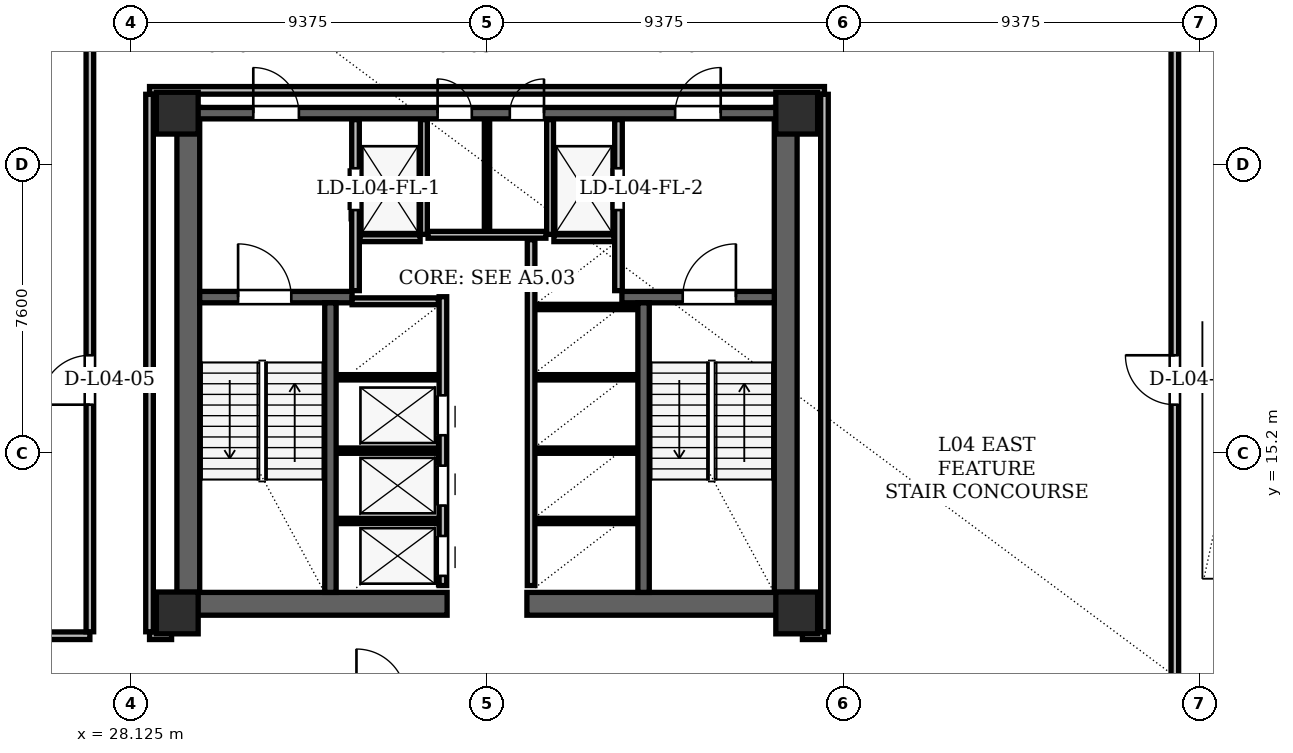
"""IFC4 building model, lengths in metres.
Left out: names, types, materials, properties, quantities, classifications, styles, units other than length and angle.
Written with IfcOpenShell. Run it as: python <this file> out.ifc"""

import sys

from ifc_helpers import new_model, si_unit, direction, frame, frame_2d, origin, origin_2d, place, context, subcontext, project, spatial, rectangle, hollow_rectangle, extrude, element, fill, save


model = new_model("IFC4")
c1 = context("Model", 3, precision=1e-05, world=origin(), true_north=direction((0.0, 1.0)))
c2 = subcontext(c1, "Body", "Model", "MODEL_VIEW")
j1 = project(units=[si_unit("LENGTHUNIT", "METRE"), si_unit("PLANEANGLEUNIT", "RADIAN")], contexts=[c1])
p1 = place(None, origin())
s1 = spatial("IfcSite", under=j1, at=p1, CompositionType="ELEMENT")
p2 = place(p1, origin())
s2 = spatial("IfcBuilding", under=s1, at=p2, CompositionType="ELEMENT")
p3 = place(p2, frame((0.0, 0.0, 18.3)))
s3 = spatial("IfcBuildingStorey", under=s2, at=p3, CompositionType="ELEMENT", Elevation=18.3)
for number, where, z_axis, x_axis in (
    (1, (29.35, 11.0, 0.0), (0.0, 0.0, 1.0), (1.0, 0.0, 0.0)),
    (2, (45.65, 11.0, 0.0), (0.0, 0.0, 1.0), (1.0, 0.0, 0.0)),
    (3, (45.65, 24.15, 0.0), (0.0, 0.0, 1.0), (1.0, 0.0, 0.0)),
    (4, (29.35, 24.15, 0.0), (0.0, 0.0, 1.0), (1.0, 0.0, 0.0)),
):
    element("IfcColumn", number, at=place(p3, frame(where, z_axis=z_axis, x_axis=x_axis)), inside=s3, PredefinedType="COLUMN", context=c2, shape_type="SweptSolid", body=[
        extrude(hollow_rectangle(XDim=1.1, YDim=1.1, WallThickness=0.09, at=origin_2d()), origin(), (0.0, 0.0, 1.0), 4.2),
    ])
for number, where, z_axis, x_axis in (
    (5, (29.64, 11.0, 0.0), (0.0, 0.0, 1.0), (0.0, 1.0, 0.0)),
    (6, (45.36, 11.0, 0.0), (0.0, 0.0, 1.0), (0.0, 1.0, 0.0)),
):
    element("IfcWall", number, at=place(p3, frame(where, z_axis=z_axis, x_axis=x_axis)), inside=s3, PredefinedType="SHEAR", context=c2, shape_type="SweptSolid", body=[
        extrude(rectangle(XDim=13.3, YDim=0.6, at=frame_2d((6.65, 0.0))), origin(), (0.0, 0.0, 1.0), 3.88),
    ])
for number, where, z_axis, x_axis in (
    (7, (29.35, 11.24, 0.0), (0.0, 0.0, 1.0), (1.0, 0.0, 0.0)),
    (8, (38.55, 11.24, 0.0), (0.0, 0.0, 1.0), (1.0, 0.0, 0.0)),
):
    element("IfcWall", number, at=place(p3, frame(where, z_axis=z_axis, x_axis=x_axis)), inside=s3, PredefinedType="SHEAR", context=c2, shape_type="SweptSolid", body=[
        extrude(rectangle(XDim=7.1, YDim=0.6, at=frame_2d((3.55, 0.0))), origin(), (0.0, 0.0, 1.0), 3.88),
    ])
p4 = place(p3, frame((29.65, 24.15, 0.0), z_axis=(0.0, 0.0, 1.0), x_axis=(1.0, 0.0, 0.0)))
e9 = element("IfcWall", 9, at=p4, inside=s3, PredefinedType="SHEAR", context=c2, shape_type="SweptSolid", body=[
    extrude(rectangle(XDim=15.7, YDim=0.3, at=frame_2d((7.85, 0.0))), origin(), (0.0, 0.0, 1.0), 3.88),
])
p5 = place(p4, frame((1.7, 0.0, 0.0)))
e10 = element("IfcOpeningElement", 10, at=p5, cuts=e9, PredefinedType="OPENING", context=c2, shape_type="SweptSolid", body=[
    extrude(rectangle(XDim=1.2, YDim=2.2, at=frame_2d((0.6, 1.1))), frame((0.0, 0.15, 0.0), z_axis=(0.0, -1.0, 0.0), x_axis=(1.0, 0.0, 0.0)), (0.0, 0.0, 1.0), 0.3),
])
p6 = place(p4, frame((12.8, 0.0, 0.0)))
e11 = element("IfcOpeningElement", 11, at=p6, cuts=e9, PredefinedType="OPENING", context=c2, shape_type="SweptSolid", body=[
    extrude(rectangle(XDim=1.2, YDim=2.2, at=frame_2d((0.6, 1.1))), frame((0.0, 0.15, 0.0), z_axis=(0.0, -1.0, 0.0), x_axis=(1.0, 0.0, 0.0)), (0.0, 0.0, 1.0), 0.3),
])
p7 = place(p4, frame((6.55, 0.0, 0.0)))
e12 = element("IfcOpeningElement", 12, at=p7, cuts=e9, PredefinedType="OPENING", context=c2, shape_type="SweptSolid", body=[
    extrude(rectangle(XDim=0.9, YDim=2.05, at=frame_2d((0.45, 1.025))), frame((0.0, 0.15, 0.0), z_axis=(0.0, -1.0, 0.0), x_axis=(1.0, 0.0, 0.0)), (0.0, 0.0, 1.0), 0.3),
])
p8 = place(p4, frame((8.45, 0.0, 0.0)))
e13 = element("IfcOpeningElement", 13, at=p8, cuts=e9, PredefinedType="OPENING", context=c2, shape_type="SweptSolid", body=[
    extrude(rectangle(XDim=0.9, YDim=2.05, at=frame_2d((0.45, 1.025))), frame((0.0, 0.15, 0.0), z_axis=(0.0, -1.0, 0.0), x_axis=(1.0, 0.0, 0.0)), (0.0, 0.0, 1.0), 0.3),
])
p9 = place(p3, frame((29.94, 19.31, 0.0), z_axis=(0.0, 0.0, 1.0), x_axis=(1.0, 0.0, 0.0)))
e14 = element("IfcWall", 14, at=p9, inside=s3, PredefinedType="SHEAR", context=c2, shape_type="SweptSolid", body=[
    extrude(rectangle(XDim=4.01, YDim=0.3, at=frame_2d((2.005, 0.0))), origin(), (0.0, 0.0, 1.0), 3.88),
])
p10 = place(p9, frame((1.01, 0.0, 0.0)))
e15 = element("IfcOpeningElement", 15, at=p10, cuts=e14, PredefinedType="OPENING", context=c2, shape_type="SweptSolid", body=[
    extrude(rectangle(XDim=1.4, YDim=2.2, at=frame_2d((0.7, 1.1))), frame((0.0, 0.15, 0.0), z_axis=(0.0, -1.0, 0.0), x_axis=(1.0, 0.0, 0.0)), (0.0, 0.0, 1.0), 0.3),
])
p11 = place(p3, frame((41.05, 19.31, 0.0), z_axis=(0.0, 0.0, 1.0), x_axis=(1.0, 0.0, 0.0)))
e16 = element("IfcWall", 16, at=p11, inside=s3, PredefinedType="SHEAR", context=c2, shape_type="SweptSolid", body=[
    extrude(rectangle(XDim=4.01, YDim=0.3, at=frame_2d((2.005, 0.0))), origin(), (0.0, 0.0, 1.0), 3.88),
])
p12 = place(p11, frame((1.6, 0.0, 0.0)))
e17 = element("IfcOpeningElement", 17, at=p12, cuts=e16, PredefinedType="OPENING", context=c2, shape_type="SweptSolid", body=[
    extrude(rectangle(XDim=1.4, YDim=2.2, at=frame_2d((0.7, 1.1))), frame((0.0, 0.15, 0.0), z_axis=(0.0, -1.0, 0.0), x_axis=(1.0, 0.0, 0.0)), (0.0, 0.0, 1.0), 0.3),
])
for number, where, z_axis, x_axis in (
    (18, (33.38, 11.54, 0.0), (0.0, 0.0, 1.0), (0.0, 1.0, 0.0)),
    (19, (41.62, 11.54, 0.0), (0.0, 0.0, 1.0), (0.0, 1.0, 0.0)),
):
    element("IfcWall", number, at=place(p3, frame(where, z_axis=z_axis, x_axis=x_axis)), inside=s3, PredefinedType="SHEAR", context=c2, shape_type="SweptSolid", body=[
        extrude(rectangle(XDim=7.62, YDim=0.3, at=frame_2d((3.81, 0.0))), origin(), (0.0, 0.0, 1.0), 3.88),
    ])
p13 = place(p3, frame((34.04, 19.48, 0.0), z_axis=(0.0, 0.0, 1.0), x_axis=(0.0, 1.0, 0.0)))
e20 = element("IfcWall", 20, at=p13, inside=s3, PredefinedType="PARTITIONING", context=c2, shape_type="SweptSolid", body=[
    extrude(rectangle(XDim=4.5, YDim=0.2, at=frame_2d((2.25, 0.0))), origin(), (0.0, 0.0, 1.0), 2.92),
])
p14 = place(p13, frame((2.12, 0.0, 0.0)))
e21 = element("IfcOpeningElement", 21, at=p14, cuts=e20, PredefinedType="OPENING", context=c2, shape_type="SweptSolid", body=[
    extrude(rectangle(XDim=1.1, YDim=2.2, at=frame_2d((0.55, 1.1))), frame((0.0, 0.1, 0.0), z_axis=(0.0, -1.0, 0.0), x_axis=(1.0, 0.0, 0.0)), (0.0, 0.0, 1.0), 0.2),
])
p15 = place(p3, frame((35.84, 20.96, 0.0), z_axis=(0.0, 0.0, 1.0), x_axis=(0.0, 1.0, 0.0)))
e22 = element("IfcWall", 22, at=p15, inside=s3, PredefinedType="PARTITIONING", context=c2, shape_type="SweptSolid", body=[
    extrude(rectangle(XDim=3.02, YDim=0.18, at=frame_2d((1.51, 0.0))), origin(), (0.0, 0.0, 1.0), 2.92),
])
p16 = place(p3, frame((34.16, 20.86, 0.0), z_axis=(0.0, 0.0, 1.0), x_axis=(1.0, 0.0, 0.0)))
e23 = element("IfcWall", 23, at=p16, inside=s3, PredefinedType="PARTITIONING", context=c2, shape_type="SweptSolid", body=[
    extrude(rectangle(XDim=1.58, YDim=0.18, at=frame_2d((0.79, 0.0))), origin(), (0.0, 0.0, 1.0), 3.88),
])
p17 = place(p3, frame((40.96, 19.48, 0.0), z_axis=(0.0, 0.0, 1.0), x_axis=(0.0, 1.0, 0.0)))
e24 = element("IfcWall", 24, at=p17, inside=s3, PredefinedType="PARTITIONING", context=c2, shape_type="SweptSolid", body=[
    extrude(rectangle(XDim=4.5, YDim=0.2, at=frame_2d((2.25, 0.0))), origin(), (0.0, 0.0, 1.0), 2.92),
])
p18 = place(p17, frame((2.12, 0.0, 0.0)))
e25 = element("IfcOpeningElement", 25, at=p18, cuts=e24, PredefinedType="OPENING", context=c2, shape_type="SweptSolid", body=[
    extrude(rectangle(XDim=1.1, YDim=2.2, at=frame_2d((0.55, 1.1))), frame((0.0, 0.1, 0.0), z_axis=(0.0, -1.0, 0.0), x_axis=(1.0, 0.0, 0.0)), (0.0, 0.0, 1.0), 0.2),
])
p19 = place(p3, frame((39.16, 20.96, 0.0), z_axis=(0.0, 0.0, 1.0), x_axis=(0.0, 1.0, 0.0)))
e26 = element("IfcWall", 26, at=p19, inside=s3, PredefinedType="PARTITIONING", context=c2, shape_type="SweptSolid", body=[
    extrude(rectangle(XDim=3.02, YDim=0.18, at=frame_2d((1.51, 0.0))), origin(), (0.0, 0.0, 1.0), 2.92),
])
p20 = place(p3, frame((39.26, 20.86, 0.0), z_axis=(0.0, 0.0, 1.0), x_axis=(1.0, 0.0, 0.0)))
e27 = element("IfcWall", 27, at=p20, inside=s3, PredefinedType="PARTITIONING", context=c2, shape_type="SweptSolid", body=[
    extrude(rectangle(XDim=1.58, YDim=0.18, at=frame_2d((0.79, 0.0))), origin(), (0.0, 0.0, 1.0), 3.88),
])
p21 = place(p3, frame((36.34, 11.72, 0.0), z_axis=(0.0, 0.0, 1.0), x_axis=(0.0, 1.0, 0.0)))
e28 = element("IfcWall", 28, at=p21, inside=s3, PredefinedType="PARTITIONING", context=c2, shape_type="SweptSolid", body=[
    extrude(rectangle(XDim=7.6, YDim=0.2, at=frame_2d((3.8, 0.0))), origin(), (0.0, 0.0, 1.0), 3.88),
])
p22 = place(p21, frame((0.255, 0.0, 0.0)))
e29 = element("IfcOpeningElement", 29, at=p22, cuts=e28, PredefinedType="OPENING", context=c2, shape_type="SweptSolid", body=[
    extrude(rectangle(XDim=1.05, YDim=2.15, at=frame_2d((0.525, 1.075))), frame((0.0, 0.1, 0.0), z_axis=(0.0, -1.0, 0.0), x_axis=(1.0, 0.0, 0.0)), (0.0, 0.0, 1.0), 0.2),
])
p23 = place(p21, frame((2.105, 0.0, 0.0)))
e30 = element("IfcOpeningElement", 30, at=p23, cuts=e28, PredefinedType="OPENING", context=c2, shape_type="SweptSolid", body=[
    extrude(rectangle(XDim=1.05, YDim=2.15, at=frame_2d((0.525, 1.075))), frame((0.0, 0.1, 0.0), z_axis=(0.0, -1.0, 0.0), x_axis=(1.0, 0.0, 0.0)), (0.0, 0.0, 1.0), 0.2),
])
p24 = place(p21, frame((3.955, 0.0, 0.0)))
e31 = element("IfcOpeningElement", 31, at=p24, cuts=e28, PredefinedType="OPENING", context=c2, shape_type="SweptSolid", body=[
    extrude(rectangle(XDim=1.05, YDim=2.15, at=frame_2d((0.525, 1.075))), frame((0.0, 0.1, 0.0), z_axis=(0.0, -1.0, 0.0), x_axis=(1.0, 0.0, 0.0)), (0.0, 0.0, 1.0), 0.2),
])
p25 = place(p3, frame((33.95, 19.2, 0.0), z_axis=(0.0, 0.0, 1.0), x_axis=(1.0, 0.0, 0.0)))
e32 = element("IfcWall", 32, at=p25, inside=s3, PredefinedType="PARTITIONING", context=c2, shape_type="SweptSolid", body=[
    extrude(rectangle(XDim=2.27, YDim=0.18, at=frame_2d((1.135, 0.0))), origin(), (0.0, 0.0, 1.0), 3.88),
])
for number, where, z_axis, x_axis in (
    (33, (33.56, 13.42, 0.0), (0.0, 0.0, 1.0), (1.0, 0.0, 0.0)),
    (34, (33.56, 15.27, 0.0), (0.0, 0.0, 1.0), (1.0, 0.0, 0.0)),
    (35, (33.56, 17.2, 0.0), (0.0, 0.0, 1.0), (1.0, 0.0, 0.0)),
):
    element("IfcWall", number, at=place(p3, frame(where, z_axis=z_axis, x_axis=x_axis)), inside=s3, PredefinedType="PARTITIONING", context=c2, shape_type="SweptSolid", body=[
        extrude(rectangle(XDim=2.66, YDim=0.14, at=frame_2d((1.33, 0.0))), origin(), (0.0, 0.0, 1.0), 3.88),
    ])
p26 = place(p3, frame((38.66, 11.72, 0.0), z_axis=(0.0, 0.0, 1.0), x_axis=(0.0, 1.0, 0.0)))
e36 = element("IfcWall", 36, at=p26, inside=s3, PredefinedType="PARTITIONING", context=c2, shape_type="SweptSolid", body=[
    extrude(rectangle(XDim=9.1, YDim=0.2, at=frame_2d((4.55, 0.0))), origin(), (0.0, 0.0, 1.0), 3.88),
])
for number, where, z_axis, x_axis in (
    (37, (38.78, 13.42, 0.0), (0.0, 0.0, 1.0), (1.0, 0.0, 0.0)),
    (38, (38.78, 15.27, 0.0), (0.0, 0.0, 1.0), (1.0, 0.0, 0.0)),
    (39, (38.78, 17.2, 0.0), (0.0, 0.0, 1.0), (1.0, 0.0, 0.0)),
    (40, (38.78, 19.05, 0.0), (0.0, 0.0, 1.0), (1.0, 0.0, 0.0)),
):
    element("IfcWall", number, at=place(p3, frame(where, z_axis=z_axis, x_axis=x_axis)), inside=s3, PredefinedType="PARTITIONING", context=c2, shape_type="SweptSolid", body=[
        extrude(rectangle(XDim=2.66, YDim=0.14, at=frame_2d((1.33, 0.0))), origin(), (0.0, 0.0, 1.0), 3.88),
    ])
p27 = place(p3, frame((35.95, 20.95, 0.0), z_axis=(0.0, 0.0, 1.0), x_axis=(1.0, 0.0, 0.0)))
e41 = element("IfcWall", 41, at=p27, inside=s3, PredefinedType="PARTITIONING", context=c2, shape_type="SweptSolid", body=[
    extrude(rectangle(XDim=3.1, YDim=0.18, at=frame_2d((1.55, 0.0))), origin(), (0.0, 0.0, 1.0), 3.88),
])
p28 = place(p3, frame((37.5, 21.06, 0.0), z_axis=(0.0, 0.0, 1.0), x_axis=(0.0, 1.0, 0.0)))
e42 = element("IfcWall", 42, at=p28, inside=s3, PredefinedType="PARTITIONING", context=c2, shape_type="SweptSolid", body=[
    extrude(rectangle(XDim=2.92, YDim=0.14, at=frame_2d((1.46, 0.0))), origin(), (0.0, 0.0, 1.0), 2.92),
])
p29 = place(p3, frame((16.25, 10.4, 0.0), z_axis=(0.0, 0.0, 1.0), x_axis=(1.0, 0.0, 0.0)))
e43 = element("IfcWall", 43, at=p29, inside=s3, PredefinedType="PARTITIONING", context=c2, shape_type="SweptSolid", body=[
    extrude(rectangle(XDim=10.8, YDim=0.2, at=frame_2d((5.4, 0.0))), origin(), (0.0, 0.0, 1.0), 3.88),
])
for number, where, z_axis, x_axis in (
    (44, (28.62, 10.4, 0.0), (0.0, 0.0, 1.0), (1.0, 0.0, 0.0)),
    (45, (45.8, 10.4, 0.0), (0.0, 0.0, 1.0), (1.0, 0.0, 0.0)),
):
    element("IfcWall", number, at=place(p3, frame(where, z_axis=z_axis, x_axis=x_axis)), inside=s3, PredefinedType="PARTITIONING", context=c2, shape_type="SweptSolid", body=[
        extrude(rectangle(XDim=0.58, YDim=0.2, at=frame_2d((0.29, 0.0))), origin(), (0.0, 0.0, 1.0), 2.943),
    ])
p30 = place(p3, frame((28.62, 24.75, 0.0), z_axis=(0.0, 0.0, 1.0), x_axis=(1.0, 0.0, 0.0)))
e46 = element("IfcWall", 46, at=p30, inside=s3, PredefinedType="PARTITIONING", context=c2, shape_type="SweptSolid", body=[
    extrude(rectangle(XDim=17.76, YDim=0.2, at=frame_2d((8.88, 0.0))), origin(), (0.0, 0.0, 1.0), 2.943),
])
p31 = place(p3, frame((27.05, 10.504, 0.0), z_axis=(0.0, 0.0, 1.0), x_axis=(0.0, 1.0, 0.0)))
e47 = element("IfcWall", 47, at=p31, inside=s3, PredefinedType="PARTITIONING", context=c2, shape_type="SweptSolid", body=[
    extrude(rectangle(XDim=28.376, YDim=0.2, at=frame_2d((14.188, 0.0))), origin(), (0.0, 0.0, 1.0), 2.943),
])
p32 = place(p31, frame((5.975, 0.0, 0.0)))
e48 = element("IfcOpeningElement", 48, at=p32, cuts=e47, PredefinedType="OPENING", context=c2, shape_type="SweptSolid", body=[
    extrude(rectangle(XDim=1.3, YDim=2.2, at=frame_2d((0.65, 1.1))), frame((0.0, 0.1, 0.0), z_axis=(0.0, -1.0, 0.0), x_axis=(1.0, 0.0, 0.0)), (0.0, 0.0, 1.0), 0.2),
])
p33 = place(p3, frame((28.62, 10.504, 0.0), z_axis=(0.0, 0.0, 1.0), x_axis=(0.0, 1.0, 0.0)))
e49 = element("IfcWall", 49, at=p33, inside=s3, PredefinedType="PARTITIONING", context=c2, shape_type="SweptSolid", body=[
    extrude(rectangle(XDim=14.142, YDim=0.2, at=frame_2d((7.071, 0.0))), origin(), (0.0, 0.0, 1.0), 2.943),
])
p34 = place(p3, frame((46.38, 10.504, 0.0), z_axis=(0.0, 0.0, 1.0), x_axis=(0.0, 1.0, 0.0)))
e50 = element("IfcWall", 50, at=p34, inside=s3, PredefinedType="PARTITIONING", context=c2, shape_type="SweptSolid", body=[
    extrude(rectangle(XDim=14.142, YDim=0.2, at=frame_2d((7.071, 0.0))), origin(), (0.0, 0.0, 1.0), 3.88),
])
p35 = place(p3, frame((55.6, 2.044, 0.0), z_axis=(0.0, 0.0, 1.0), x_axis=(0.0, 1.0, 0.0)))
e51 = element("IfcWall", 51, at=p35, inside=s3, PredefinedType="PARTITIONING", context=c2, shape_type="SweptSolid", body=[
    extrude(rectangle(XDim=41.512, YDim=0.2, at=frame_2d((20.756, 0.0))), origin(), (0.0, 0.0, 1.0), 2.67),
])
p36 = place(p35, frame((14.435, 0.0, 0.0)))
e52 = element("IfcOpeningElement", 52, at=p36, cuts=e51, PredefinedType="OPENING", context=c2, shape_type="SweptSolid", body=[
    extrude(rectangle(XDim=1.3, YDim=2.2, at=frame_2d((0.65, 1.1))), frame((0.0, 0.1, 0.0), z_axis=(0.0, -1.0, 0.0), x_axis=(1.0, 0.0, 0.0)), (0.0, 0.0, 1.0), 0.2),
])
p37 = place(p14, origin())
e53 = element("IfcDoor", 53, at=p37, inside=s3, OperationType="SLIDING_TO_LEFT", PredefinedType="DOOR", context=c2, shape_type="SweptSolid", body=[
    extrude(rectangle(XDim=1.1, YDim=2.2, at=frame_2d((0.55, 1.1))), frame((0.0, 0.025, 0.0), z_axis=(0.0, -1.0, 0.0), x_axis=(1.0, 0.0, 0.0)), (0.0, 0.0, 1.0), 0.05),
])
fill(e21, e53)
p38 = place(p18, origin())
e54 = element("IfcDoor", 54, at=p38, inside=s3, OperationType="SLIDING_TO_RIGHT", PredefinedType="DOOR", context=c2, shape_type="SweptSolid", body=[
    extrude(rectangle(XDim=1.1, YDim=2.2, at=frame_2d((0.55, 1.1))), frame((0.0, 0.025, 0.0), z_axis=(0.0, -1.0, 0.0), x_axis=(1.0, 0.0, 0.0)), (0.0, 0.0, 1.0), 0.05),
])
fill(e25, e54)
p39 = place(p22, origin())
e55 = element("IfcDoor", 55, at=p39, inside=s3, OperationType="SLIDING_TO_LEFT", PredefinedType="DOOR", context=c2, shape_type="SweptSolid", body=[
    extrude(rectangle(XDim=1.05, YDim=2.15, at=frame_2d((0.525, 1.075))), frame((0.0, 0.025, 0.0), z_axis=(0.0, -1.0, 0.0), x_axis=(1.0, 0.0, 0.0)), (0.0, 0.0, 1.0), 0.05),
])
fill(e29, e55)
p40 = place(p23, origin())
e56 = element("IfcDoor", 56, at=p40, inside=s3, OperationType="SLIDING_TO_RIGHT", PredefinedType="DOOR", context=c2, shape_type="SweptSolid", body=[
    extrude(rectangle(XDim=1.05, YDim=2.15, at=frame_2d((0.525, 1.075))), frame((0.0, 0.025, 0.0), z_axis=(0.0, -1.0, 0.0), x_axis=(1.0, 0.0, 0.0)), (0.0, 0.0, 1.0), 0.05),
])
fill(e30, e56)
p41 = place(p24, origin())
e57 = element("IfcDoor", 57, at=p41, inside=s3, OperationType="SLIDING_TO_LEFT", PredefinedType="DOOR", context=c2, shape_type="SweptSolid", body=[
    extrude(rectangle(XDim=1.05, YDim=2.15, at=frame_2d((0.525, 1.075))), frame((0.0, 0.025, 0.0), z_axis=(0.0, -1.0, 0.0), x_axis=(1.0, 0.0, 0.0)), (0.0, 0.0, 1.0), 0.05),
])
fill(e31, e57)
p42 = place(p10, origin())
e58 = element("IfcDoor", 58, at=p42, inside=s3, OperationType="SINGLE_SWING_LEFT", PredefinedType="DOOR", context=c2, shape_type="SweptSolid", body=[
    extrude(rectangle(XDim=1.4, YDim=2.2, at=frame_2d((0.7, 1.1))), frame((0.0, 0.025, 0.0), z_axis=(0.0, -1.0, 0.0), x_axis=(1.0, 0.0, 0.0)), (0.0, 0.0, 1.0), 0.05),
])
fill(e15, e58)
p43 = place(p12, origin())
e59 = element("IfcDoor", 59, at=p43, inside=s3, OperationType="SINGLE_SWING_RIGHT", PredefinedType="DOOR", context=c2, shape_type="SweptSolid", body=[
    extrude(rectangle(XDim=1.4, YDim=2.2, at=frame_2d((0.7, 1.1))), frame((0.0, 0.025, 0.0), z_axis=(0.0, -1.0, 0.0), x_axis=(1.0, 0.0, 0.0)), (0.0, 0.0, 1.0), 0.05),
])
fill(e17, e59)
p44 = place(p5, origin())
e60 = element("IfcDoor", 60, at=p44, inside=s3, OperationType="SINGLE_SWING_LEFT", PredefinedType="DOOR", context=c2, shape_type="SweptSolid", body=[
    extrude(rectangle(XDim=1.2, YDim=2.2, at=frame_2d((0.6, 1.1))), frame((0.0, 0.025, 0.0), z_axis=(0.0, -1.0, 0.0), x_axis=(1.0, 0.0, 0.0)), (0.0, 0.0, 1.0), 0.05),
])
fill(e10, e60)
p45 = place(p6, origin())
e61 = element("IfcDoor", 61, at=p45, inside=s3, OperationType="SINGLE_SWING_RIGHT", PredefinedType="DOOR", context=c2, shape_type="SweptSolid", body=[
    extrude(rectangle(XDim=1.2, YDim=2.2, at=frame_2d((0.6, 1.1))), frame((0.0, 0.025, 0.0), z_axis=(0.0, -1.0, 0.0), x_axis=(1.0, 0.0, 0.0)), (0.0, 0.0, 1.0), 0.05),
])
fill(e11, e61)
p46 = place(p7, origin())
e62 = element("IfcDoor", 62, at=p46, inside=s3, OperationType="SINGLE_SWING_LEFT", PredefinedType="DOOR", context=c2, shape_type="SweptSolid", body=[
    extrude(rectangle(XDim=0.9, YDim=2.05, at=frame_2d((0.45, 1.025))), frame((0.0, 0.025, 0.0), z_axis=(0.0, -1.0, 0.0), x_axis=(1.0, 0.0, 0.0)), (0.0, 0.0, 1.0), 0.05),
])
fill(e12, e62)
p47 = place(p8, origin())
e63 = element("IfcDoor", 63, at=p47, inside=s3, OperationType="SINGLE_SWING_RIGHT", PredefinedType="DOOR", context=c2, shape_type="SweptSolid", body=[
    extrude(rectangle(XDim=0.9, YDim=2.05, at=frame_2d((0.45, 1.025))), frame((0.0, 0.025, 0.0), z_axis=(0.0, -1.0, 0.0), x_axis=(1.0, 0.0, 0.0)), (0.0, 0.0, 1.0), 0.05),
])
fill(e13, e63)
p48 = place(p32, origin())
e64 = element("IfcDoor", 64, at=p48, inside=s3, OperationType="SINGLE_SWING_LEFT", PredefinedType="DOOR", context=c2, shape_type="SweptSolid", body=[
    extrude(rectangle(XDim=1.3, YDim=2.2, at=frame_2d((0.65, 1.1))), frame((0.0, 0.025, 0.0), z_axis=(0.0, -1.0, 0.0), x_axis=(1.0, 0.0, 0.0)), (0.0, 0.0, 1.0), 0.05),
])
fill(e48, e64)
p49 = place(p36, origin())
e65 = element("IfcDoor", 65, at=p49, inside=s3, OperationType="SINGLE_SWING_RIGHT", PredefinedType="DOOR", context=c2, shape_type="SweptSolid", body=[
    extrude(rectangle(XDim=1.3, YDim=2.2, at=frame_2d((0.65, 1.1))), frame((0.0, 0.025, 0.0), z_axis=(0.0, -1.0, 0.0), x_axis=(1.0, 0.0, 0.0)), (0.0, 0.0, 1.0), 0.05),
])
fill(e52, e65)
save(model, sys.argv[1])
